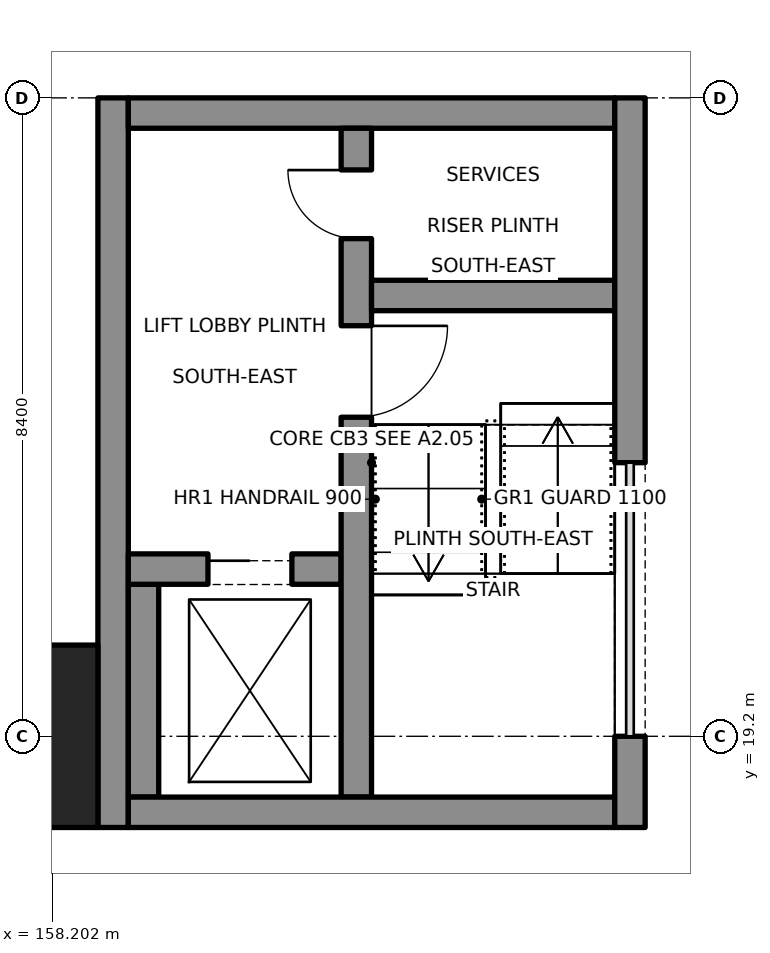
"""IFC4 building model, lengths in metres.
Left out: names, types, materials, properties, quantities, classifications, styles, units other than length and angle.
Written with IfcOpenShell. Run it as: python <this file> out.ifc"""

import sys

from ifc_helpers import new_model, si_unit, direction, frame, frame_2d, origin, origin_2d, place, context, subcontext, project, spatial, rectangle, extrude, element, fill, save


model = new_model("IFC4")
c1 = context("Model", 3, precision=1e-05, world=origin(), true_north=direction((0.0, 1.0)))
c2 = subcontext(c1, "Body", "Model", "MODEL_VIEW")
j1 = project(units=[si_unit("LENGTHUNIT", "METRE"), si_unit("PLANEANGLEUNIT", "RADIAN")], contexts=[c1])
p1 = place(None, origin())
s1 = spatial("IfcSite", under=j1, at=p1, CompositionType="ELEMENT")
p2 = place(p1, origin())
s2 = spatial("IfcBuilding", under=s1, at=p2, CompositionType="ELEMENT")
p3 = place(p2, frame((0.0, 0.0, 8.8)))
s3 = spatial("IfcBuildingStorey", under=s2, at=p3, CompositionType="ELEMENT", Elevation=8.8)
p4 = place(p3, frame((157.6, 19.2, 0.0), z_axis=(0.0, 0.0, 1.0), x_axis=(1.0, 0.0, 0.0)))
e1 = element("IfcColumn", 1, at=p4, inside=s3, PredefinedType="COLUMN", context=c2, shape_type="SweptSolid", body=[
    extrude(rectangle(XDim=2.4, YDim=2.4, at=origin_2d()), origin(), (0.0, 0.0, 1.0), 3.65),
])
p5 = place(p3, frame((165.8, 19.2, 0.0), z_axis=(0.0, 0.0, 1.0), x_axis=(0.0, -1.0, 0.0)))
e2 = element("IfcWall", 2, at=p5, inside=s3, PredefinedType="SHEAR", context=c2, shape_type="SweptSolid", body=[
    extrude(rectangle(XDim=1.2, YDim=0.4, at=frame_2d((0.6, 0.0))), origin(), (0.0, 0.0, 1.0), 5.2),
])
p6 = place(p3, frame((165.8, 27.6, 0.0), z_axis=(0.0, 0.0, 1.0), x_axis=(0.0, -1.0, 0.0)))
e3 = element("IfcWall", 3, at=p6, inside=s3, PredefinedType="SHEAR", context=c2, shape_type="SweptSolid", body=[
    extrude(rectangle(XDim=4.8, YDim=0.4, at=frame_2d((2.4, 0.0))), origin(), (0.0, 0.0, 1.0), 5.2),
])
p7 = place(p3, frame((159.0, 18.0, 0.0), z_axis=(0.0, 0.0, 1.0), x_axis=(0.0, 1.0, 0.0)))
e4 = element("IfcWall", 4, at=p7, inside=s3, PredefinedType="SHEAR", context=c2, shape_type="SweptSolid", body=[
    extrude(rectangle(XDim=9.6, YDim=0.4, at=frame_2d((4.8, 0.0))), origin(), (0.0, 0.0, 1.0), 5.2),
])
for number, where, z_axis, x_axis in (
    (5, (159.2, 18.2, 0.0), (0.0, 0.0, 1.0), (1.0, 0.0, 0.0)),
    (6, (159.2, 27.4, 0.0), (0.0, 0.0, 1.0), (1.0, 0.0, 0.0)),
):
    element("IfcWall", number, at=place(p3, frame(where, z_axis=z_axis, x_axis=x_axis)), inside=s3, PredefinedType="SHEAR", context=c2, shape_type="SweptSolid", body=[
        extrude(rectangle(XDim=6.4, YDim=0.4, at=frame_2d((3.2, 0.0))), origin(), (0.0, 0.0, 1.0), 5.2),
    ])
p8 = place(p3, frame((162.2, 18.4, 0.0), z_axis=(0.0, 0.0, 1.0), x_axis=(0.0, 1.0, 0.0)))
e7 = element("IfcWall", 7, at=p8, inside=s3, PredefinedType="SHEAR", context=c2, shape_type="SweptSolid", body=[
    extrude(rectangle(XDim=8.8, YDim=0.4, at=frame_2d((4.4, 0.0))), origin(), (0.0, 0.0, 1.0), 5.2),
])
p9 = place(p8, frame((5.0, 0.0, 0.0)))
e8 = element("IfcOpeningElement", 8, at=p9, cuts=e7, PredefinedType="OPENING", context=c2, shape_type="SweptSolid", body=[
    extrude(rectangle(XDim=1.2, YDim=2.1, at=frame_2d((0.6, 1.05))), frame((0.0, 0.21, 0.0), z_axis=(0.0, -1.0, 0.0), x_axis=(1.0, 0.0, 0.0)), (0.0, 0.0, 1.0), 0.42),
])
p10 = place(p8, frame((7.35, 0.0, 0.0)))
e9 = element("IfcOpeningElement", 9, at=p10, cuts=e7, PredefinedType="OPENING", context=c2, shape_type="SweptSolid", body=[
    extrude(rectangle(XDim=0.9, YDim=2.1, at=frame_2d((0.45, 1.05))), frame((0.0, 0.21, 0.0), z_axis=(0.0, -1.0, 0.0), x_axis=(1.0, 0.0, 0.0)), (0.0, 0.0, 1.0), 0.42),
])
p11 = place(p3, frame((162.4, 25.0, 0.0), z_axis=(0.0, 0.0, 1.0), x_axis=(1.0, 0.0, 0.0)))
e10 = element("IfcWall", 10, at=p11, inside=s3, PredefinedType="SHEAR", context=c2, shape_type="SweptSolid", body=[
    extrude(rectangle(XDim=3.2, YDim=0.4, at=frame_2d((1.6, 0.0))), origin(), (0.0, 0.0, 1.0), 5.2),
])
p12 = place(p3, frame((159.2, 21.4, 0.0), z_axis=(0.0, 0.0, 1.0), x_axis=(1.0, 0.0, 0.0)))
e11 = element("IfcWall", 11, at=p12, inside=s3, PredefinedType="SHEAR", context=c2, shape_type="SweptSolid", body=[
    extrude(rectangle(XDim=2.8, YDim=0.4, at=frame_2d((1.4, 0.0))), origin(), (0.0, 0.0, 1.0), 5.2),
])
p13 = place(p12, frame((1.05, 0.0, 0.0)))
e12 = element("IfcOpeningElement", 12, at=p13, cuts=e11, PredefinedType="OPENING", context=c2, shape_type="SweptSolid", body=[
    extrude(rectangle(XDim=1.1, YDim=2.1, at=frame_2d((0.55, 1.05))), frame((0.0, 0.21, 0.0), z_axis=(0.0, -1.0, 0.0), x_axis=(1.0, 0.0, 0.0)), (0.0, 0.0, 1.0), 0.42),
])
p14 = place(p3, frame((159.4, 18.4, 0.0), z_axis=(0.0, 0.0, 1.0), x_axis=(0.0, 1.0, 0.0)))
e13 = element("IfcWall", 13, at=p14, inside=s3, PredefinedType="SHEAR", context=c2, shape_type="SweptSolid", body=[
    extrude(rectangle(XDim=2.8, YDim=0.4, at=frame_2d((1.4, 0.0))), origin(), (0.0, 0.0, 1.0), 5.2),
])
p15 = place(p9, origin())
e14 = element("IfcDoor", 14, at=p15, inside=s3, OperationType="SINGLE_SWING_RIGHT", PredefinedType="DOOR", context=c2, shape_type="SweptSolid", body=[
    extrude(rectangle(XDim=1.2, YDim=2.1, at=frame_2d((0.6, 1.05))), frame((0.0, 0.025, 0.0), z_axis=(0.0, -1.0, 0.0), x_axis=(1.0, 0.0, 0.0)), (0.0, 0.0, 1.0), 0.05),
])
fill(e8, e14)
p16 = place(p10, origin())
e15 = element("IfcDoor", 15, at=p16, inside=s3, OperationType="SINGLE_SWING_RIGHT", PredefinedType="DOOR", context=c2, shape_type="SweptSolid", body=[
    extrude(rectangle(XDim=0.9, YDim=2.1, at=frame_2d((0.45, 1.05))), frame((0.0, 0.025, 0.0), z_axis=(0.0, -1.0, 0.0), x_axis=(1.0, 0.0, 0.0)), (0.0, 0.0, 1.0), 0.05),
])
fill(e9, e15)
p17 = place(p13, origin())
e16 = element("IfcDoor", 16, at=p17, inside=s3, OperationType="SLIDING_TO_RIGHT", PredefinedType="DOOR", context=c2, shape_type="SweptSolid", body=[
    extrude(rectangle(XDim=1.1, YDim=2.1, at=frame_2d((0.55, 1.05))), frame((0.0, 0.025, 0.0), z_axis=(0.0, -1.0, 0.0), x_axis=(1.0, 0.0, 0.0)), (0.0, 0.0, 1.0), 0.05),
])
fill(e12, e16)
save(model, sys.argv[1])
